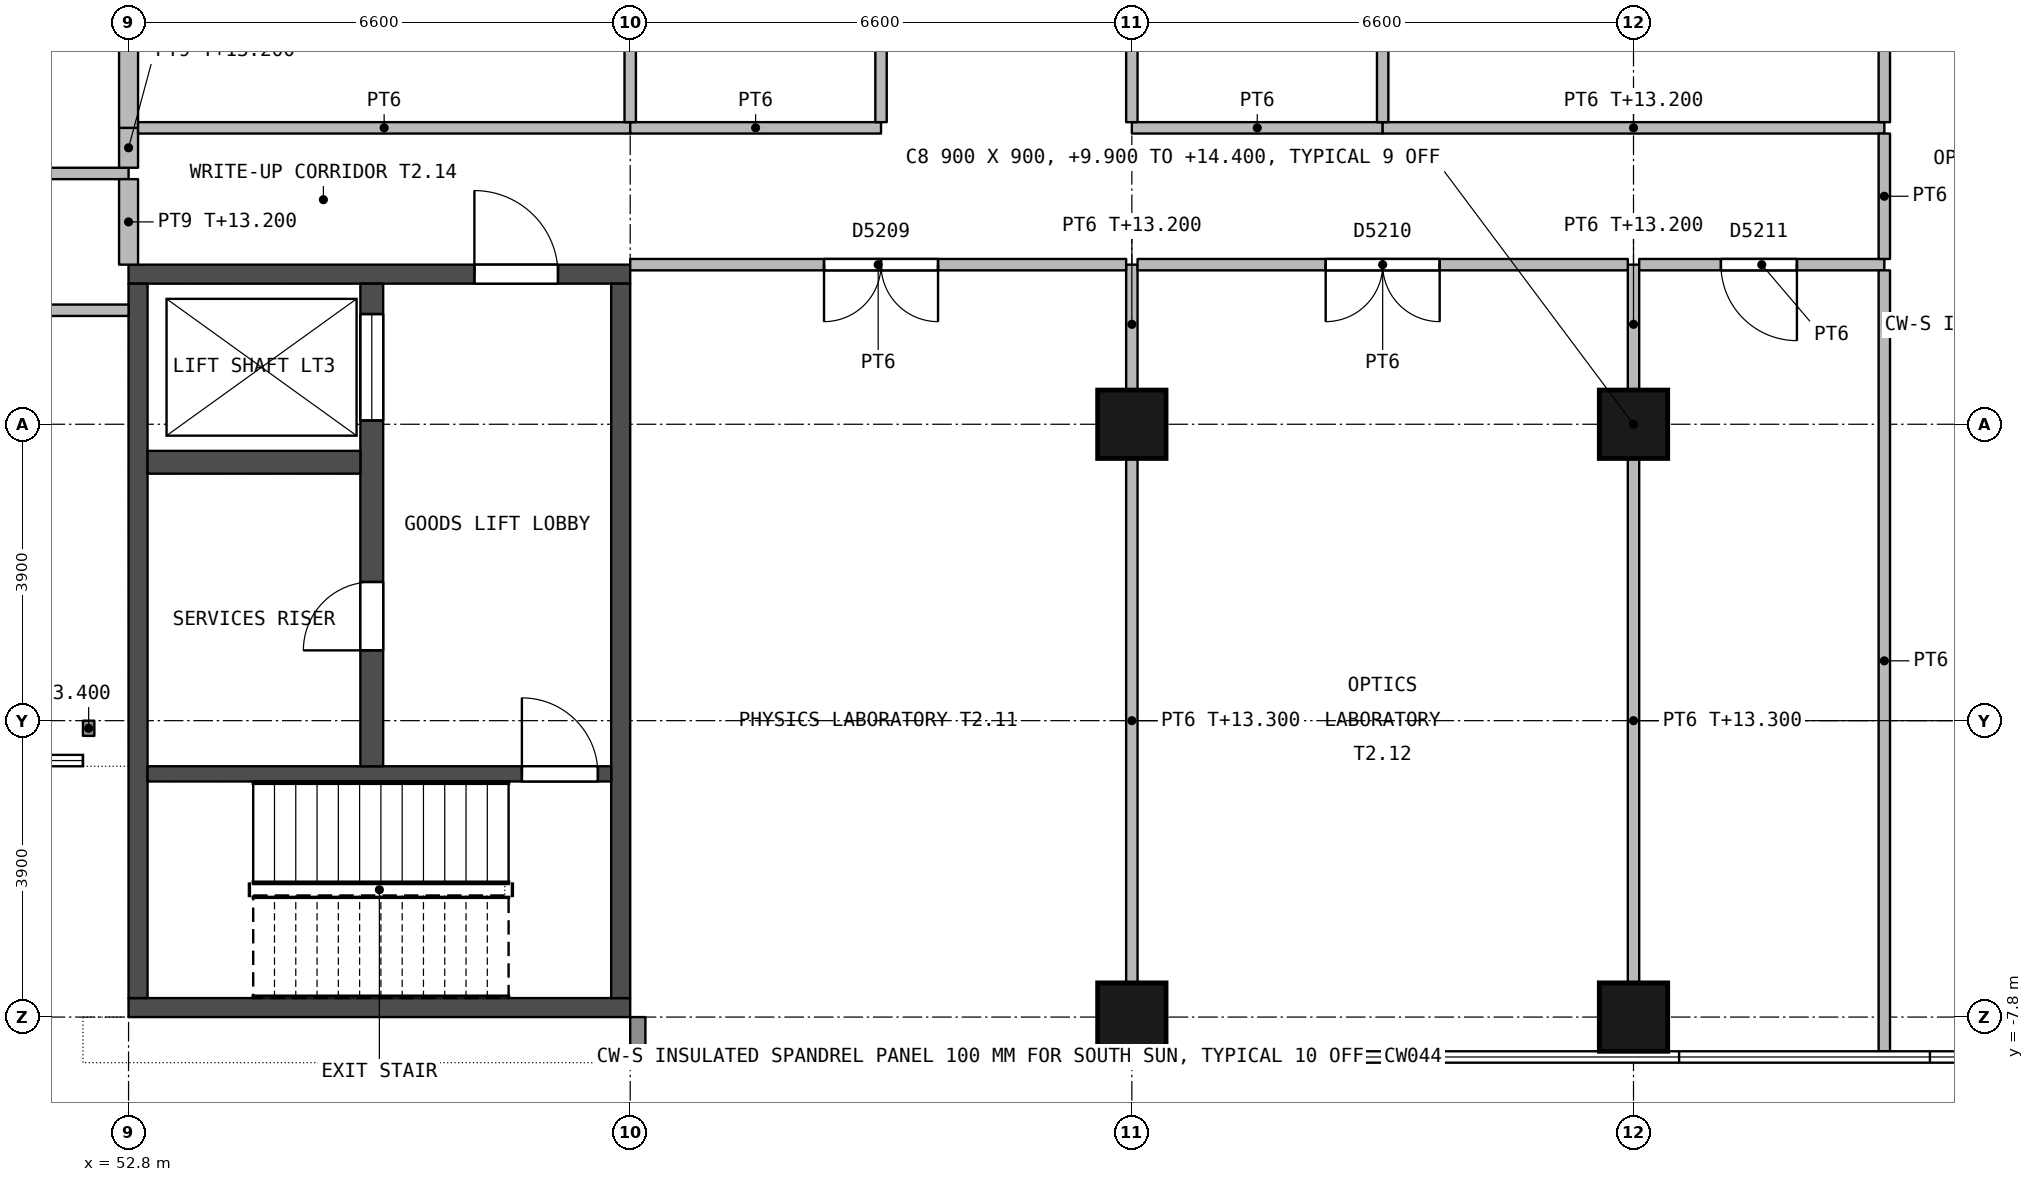
"""IFC4 building model, lengths in metres.
Left out: names, types, materials, properties, quantities, classifications, styles, units other than length and angle.
Written with IfcOpenShell. Run it as: python <this file> out.ifc"""

import sys

from ifc_helpers import new_model, si_unit, direction, frame, frame_2d, origin, origin_2d, place, context, subcontext, project, spatial, rectangle, extrude, element, fill, save


model = new_model("IFC4")
c1 = context("Model", 3, precision=1e-05, world=origin(), true_north=direction((0.0, 1.0)))
c2 = subcontext(c1, "Body", "Model", "MODEL_VIEW")
j1 = project(units=[si_unit("LENGTHUNIT", "METRE"), si_unit("PLANEANGLEUNIT", "RADIAN")], contexts=[c1])
p1 = place(None, origin())
s1 = spatial("IfcSite", under=j1, at=p1, CompositionType="ELEMENT")
p2 = place(p1, origin())
s2 = spatial("IfcBuilding", under=s1, at=p2, CompositionType="ELEMENT")
p3 = place(p2, frame((0.0, 0.0, 9.9)))
s3 = spatial("IfcBuildingStorey", under=s2, at=p3, CompositionType="ELEMENT", Elevation=9.9)
for number, where, z_axis, x_axis in (
    (1, (66.0, -7.8, 0.0), (0.0, 0.0, 1.0), (1.0, 0.0, 0.0)),
    (2, (66.0, 0.0, 0.0), (0.0, 0.0, 1.0), (1.0, 0.0, 0.0)),
    (3, (72.6, -7.8, 0.0), (0.0, 0.0, 1.0), (1.0, 0.0, 0.0)),
    (4, (72.6, 0.0, 0.0), (0.0, 0.0, 1.0), (1.0, 0.0, 0.0)),
):
    element("IfcColumn", number, at=place(p3, frame(where, z_axis=z_axis, x_axis=x_axis)), inside=s3, PredefinedType="COLUMN", context=c2, shape_type="SweptSolid", body=[
        extrude(rectangle(XDim=0.9, YDim=0.9, at=origin_2d()), origin(), (0.0, 0.0, 1.0), 4.5),
    ])
p4 = place(p3, frame((59.4, 1.975, 0.0), z_axis=(0.0, 0.0, 1.0), x_axis=(-1.0, 0.0, 0.0)))
e5 = element("IfcWall", 5, at=p4, inside=s3, PredefinedType="SHEAR", context=c2, shape_type="SweptSolid", body=[
    extrude(rectangle(XDim=6.6, YDim=0.25, at=frame_2d((3.3, 0.0))), origin(), (0.0, 0.0, 1.0), 4.2),
])
p5 = place(p4, frame((0.95, 0.0, 0.0)))
e6 = element("IfcOpeningElement", 6, at=p5, cuts=e5, PredefinedType="OPENING", context=c2, shape_type="SweptSolid", body=[
    extrude(rectangle(XDim=1.1, YDim=2.1, at=frame_2d((0.55, 1.05))), frame((0.0, 0.135, 0.0), z_axis=(0.0, -1.0, 0.0), x_axis=(1.0, 0.0, 0.0)), (0.0, 0.0, 1.0), 0.27),
])
p6 = place(p3, frame((59.4, -7.675, 0.0), z_axis=(0.0, 0.0, 1.0), x_axis=(-1.0, 0.0, 0.0)))
e7 = element("IfcWall", 7, at=p6, inside=s3, PredefinedType="SHEAR", context=c2, shape_type="SweptSolid", body=[
    extrude(rectangle(XDim=6.6, YDim=0.25, at=frame_2d((3.3, 0.0))), origin(), (0.0, 0.0, 1.0), 4.2),
])
for number, where, z_axis, x_axis in (
    (8, (59.275, 1.85, 0.0), (0.0, 0.0, 1.0), (0.0, -1.0, 0.0)),
    (9, (52.925, 1.85, 0.0), (0.0, 0.0, 1.0), (0.0, -1.0, 0.0)),
):
    element("IfcWall", number, at=place(p3, frame(where, z_axis=z_axis, x_axis=x_axis)), inside=s3, PredefinedType="SHEAR", context=c2, shape_type="SweptSolid", body=[
        extrude(rectangle(XDim=9.4, YDim=0.25, at=frame_2d((4.7, 0.0))), origin(), (0.0, 0.0, 1.0), 4.2),
    ])
p7 = place(p3, frame((59.15, -4.6, 0.0), z_axis=(0.0, 0.0, 1.0), x_axis=(-1.0, 0.0, 0.0)))
e10 = element("IfcWall", 10, at=p7, inside=s3, PredefinedType="SHEAR", context=c2, shape_type="SweptSolid", body=[
    extrude(rectangle(XDim=6.1, YDim=0.2, at=frame_2d((3.05, 0.0))), origin(), (0.0, 0.0, 1.0), 4.2),
])
p8 = place(p7, frame((0.175, 0.0, 0.0)))
e11 = element("IfcOpeningElement", 11, at=p8, cuts=e10, PredefinedType="OPENING", context=c2, shape_type="SweptSolid", body=[
    extrude(rectangle(XDim=1.0, YDim=2.1, at=frame_2d((0.5, 1.05))), frame((0.0, 0.11, 0.0), z_axis=(0.0, -1.0, 0.0), x_axis=(1.0, 0.0, 0.0)), (0.0, 0.0, 1.0), 0.22),
])
p9 = place(p3, frame((56.0, 1.85, 0.0), z_axis=(0.0, 0.0, 1.0), x_axis=(0.0, -1.0, 0.0)))
e12 = element("IfcWall", 12, at=p9, inside=s3, PredefinedType="SHEAR", context=c2, shape_type="SweptSolid", body=[
    extrude(rectangle(XDim=6.35, YDim=0.3, at=frame_2d((3.175, 0.0))), origin(), (0.0, 0.0, 1.0), 4.2),
])
p10 = place(p9, frame((3.925, 0.0, 0.0)))
e13 = element("IfcOpeningElement", 13, at=p10, cuts=e12, PredefinedType="OPENING", context=c2, shape_type="SweptSolid", body=[
    extrude(rectangle(XDim=0.9, YDim=2.1, at=frame_2d((0.45, 1.05))), frame((0.0, 0.16, 0.0), z_axis=(0.0, -1.0, 0.0), x_axis=(1.0, 0.0, 0.0)), (0.0, 0.0, 1.0), 0.32),
])
p11 = place(p9, frame((0.4, 0.0, 0.0)))
e14 = element("IfcOpeningElement", 14, at=p11, cuts=e12, PredefinedType="OPENING", context=c2, shape_type="SweptSolid", body=[
    extrude(rectangle(XDim=1.4, YDim=2.4, at=frame_2d((0.7, 1.2))), frame((0.0, 0.16, 0.0), z_axis=(0.0, -1.0, 0.0), x_axis=(1.0, 0.0, 0.0)), (0.0, 0.0, 1.0), 0.32),
])
p12 = place(p3, frame((55.85, -0.5, 0.0), z_axis=(0.0, 0.0, 1.0), x_axis=(-1.0, 0.0, 0.0)))
e15 = element("IfcWall", 15, at=p12, inside=s3, PredefinedType="SHEAR", context=c2, shape_type="SweptSolid", body=[
    extrude(rectangle(XDim=2.8, YDim=0.3, at=frame_2d((1.4, 0.0))), origin(), (0.0, 0.0, 1.0), 4.2),
])
p13 = place(p3, frame((59.5, -7.8, 0.0), z_axis=(0.0, 0.0, 1.0), x_axis=(0.0, -1.0, 0.0)))
e16 = element("IfcWall", 16, at=p13, inside=s3, PredefinedType="STANDARD", context=c2, shape_type="SweptSolid", body=[
    extrude(rectangle(XDim=0.6, YDim=0.2, at=frame_2d((0.3, 0.0))), origin(), (0.0, 0.0, 1.0), 3.5),
])
p14 = place(p3, frame((52.275, -4.1, 0.0), z_axis=(0.0, 0.0, 1.0), x_axis=(0.0, 1.0, 0.0)))
e17 = element("IfcWall", 17, at=p14, inside=s3, PredefinedType="STANDARD", context=c2, shape_type="SweptSolid", body=[
    extrude(rectangle(XDim=0.2, YDim=0.15, at=frame_2d((0.1, 0.0))), origin(), (0.0, 0.0, 1.0), 3.5),
])
p15 = place(p3, frame((52.8, 1.5, 0.0), z_axis=(0.0, 0.0, 1.0), x_axis=(-1.0, 0.0, 0.0)))
e18 = element("IfcWall", 18, at=p15, inside=s3, PredefinedType="PARTITIONING", context=c2, shape_type="SweptSolid", body=[
    extrude(rectangle(XDim=6.525, YDim=0.15, at=frame_2d((3.262, 0.0))), origin(), (0.0, 0.0, 1.0), 4.2),
])
p16 = place(p15, frame((2.55, 0.0, 0.0)))
e19 = element("IfcOpeningElement", 19, at=p16, cuts=e18, PredefinedType="OPENING", context=c2, shape_type="SweptSolid", body=[
    extrude(rectangle(XDim=1.5, YDim=2.1, at=frame_2d((0.75, 1.05))), frame((0.0, 0.085, 0.0), z_axis=(0.0, -1.0, 0.0), x_axis=(1.0, 0.0, 0.0)), (0.0, 0.0, 1.0), 0.17),
])
p17 = place(p3, frame((52.8, 3.3, 0.0), z_axis=(0.0, 0.0, 1.0), x_axis=(-1.0, 0.0, 0.0)))
e20 = element("IfcWall", 20, at=p17, inside=s3, PredefinedType="PARTITIONING", context=c2, shape_type="SweptSolid", body=[
    extrude(rectangle(XDim=6.6, YDim=0.15, at=frame_2d((3.3, 0.0))), origin(), (0.0, 0.0, 1.0), 3.6),
])
p18 = place(p3, frame((52.8, 2.1, 0.0), z_axis=(0.0, 0.0, 1.0), x_axis=(0.0, 1.0, 0.0)))
e21 = element("IfcWall", 21, at=p18, inside=s3, PredefinedType="PARTITIONING", context=c2, shape_type="SweptSolid", body=[
    extrude(rectangle(XDim=1.125, YDim=0.25, at=frame_2d((0.562, 0.0))), origin(), (0.0, 0.0, 1.0), 3.3),
])
p19 = place(p3, frame((52.8, 3.375, 0.0), z_axis=(0.0, 0.0, 1.0), x_axis=(0.0, 1.0, 0.0)))
e22 = element("IfcWall", 22, at=p19, inside=s3, PredefinedType="PARTITIONING", context=c2, shape_type="SweptSolid", body=[
    extrude(rectangle(XDim=0.525, YDim=0.25, at=frame_2d((0.262, 0.0))), origin(), (0.0, 0.0, 1.0), 3.3),
])
p20 = place(p3, frame((52.8, 3.9, 0.0), z_axis=(0.0, 0.0, 1.0), x_axis=(0.0, 1.0, 0.0)))
e23 = element("IfcWall", 23, at=p20, inside=s3, PredefinedType="PARTITIONING", context=c2, shape_type="SweptSolid", body=[
    extrude(rectangle(XDim=5.55, YDim=0.25, at=frame_2d((2.775, 0.0))), origin(), (0.0, 0.0, 1.0), 3.3),
])
p21 = place(p3, frame((66.0, -7.35, 0.0), z_axis=(0.0, 0.0, 1.0), x_axis=(0.0, 1.0, 0.0)))
e24 = element("IfcWall", 24, at=p21, inside=s3, PredefinedType="PARTITIONING", context=c2, shape_type="SweptSolid", body=[
    extrude(rectangle(XDim=6.9, YDim=0.15, at=frame_2d((3.45, 0.0))), origin(), (0.0, 0.0, 1.0), 3.4),
])
p22 = place(p3, frame((66.0, 0.45, 0.0), z_axis=(0.0, 0.0, 1.0), x_axis=(0.0, 1.0, 0.0)))
e25 = element("IfcWall", 25, at=p22, inside=s3, PredefinedType="PARTITIONING", context=c2, shape_type="SweptSolid", body=[
    extrude(rectangle(XDim=1.65, YDim=0.15, at=frame_2d((0.825, 0.0))), origin(), (0.0, 0.0, 1.0), 3.3),
])
p23 = place(p3, frame((65.925, 2.1, 0.0), z_axis=(0.0, 0.0, 1.0), x_axis=(-1.0, 0.0, 0.0)))
e26 = element("IfcWall", 26, at=p23, inside=s3, PredefinedType="PARTITIONING", context=c2, shape_type="SweptSolid", body=[
    extrude(rectangle(XDim=6.525, YDim=0.15, at=frame_2d((3.262, 0.0))), origin(), (0.0, 0.0, 1.0), 4.2),
])
p24 = place(p23, frame((2.475, 0.0, 0.0)))
e27 = element("IfcOpeningElement", 27, at=p24, cuts=e26, PredefinedType="OPENING", context=c2, shape_type="SweptSolid", body=[
    extrude(rectangle(XDim=1.5, YDim=2.1, at=frame_2d((0.75, 1.05))), frame((0.0, 0.085, 0.0), z_axis=(0.0, -1.0, 0.0), x_axis=(1.0, 0.0, 0.0)), (0.0, 0.0, 1.0), 0.17),
])
p25 = place(p3, frame((72.6, -7.35, 0.0), z_axis=(0.0, 0.0, 1.0), x_axis=(0.0, 1.0, 0.0)))
e28 = element("IfcWall", 28, at=p25, inside=s3, PredefinedType="PARTITIONING", context=c2, shape_type="SweptSolid", body=[
    extrude(rectangle(XDim=6.9, YDim=0.15, at=frame_2d((3.45, 0.0))), origin(), (0.0, 0.0, 1.0), 3.4),
])
p26 = place(p3, frame((72.6, 0.45, 0.0), z_axis=(0.0, 0.0, 1.0), x_axis=(0.0, 1.0, 0.0)))
e29 = element("IfcWall", 29, at=p26, inside=s3, PredefinedType="PARTITIONING", context=c2, shape_type="SweptSolid", body=[
    extrude(rectangle(XDim=1.65, YDim=0.15, at=frame_2d((0.825, 0.0))), origin(), (0.0, 0.0, 1.0), 3.3),
])
p27 = place(p3, frame((72.525, 2.1, 0.0), z_axis=(0.0, 0.0, 1.0), x_axis=(-1.0, 0.0, 0.0)))
e30 = element("IfcWall", 30, at=p27, inside=s3, PredefinedType="PARTITIONING", context=c2, shape_type="SweptSolid", body=[
    extrude(rectangle(XDim=6.45, YDim=0.15, at=frame_2d((3.225, 0.0))), origin(), (0.0, 0.0, 1.0), 4.2),
])
p28 = place(p27, frame((2.475, 0.0, 0.0)))
e31 = element("IfcOpeningElement", 31, at=p28, cuts=e30, PredefinedType="OPENING", context=c2, shape_type="SweptSolid", body=[
    extrude(rectangle(XDim=1.5, YDim=2.1, at=frame_2d((0.75, 1.05))), frame((0.0, 0.085, 0.0), z_axis=(0.0, -1.0, 0.0), x_axis=(1.0, 0.0, 0.0)), (0.0, 0.0, 1.0), 0.17),
])
p29 = place(p3, frame((75.9, 2.1, 0.0), z_axis=(0.0, 0.0, 1.0), x_axis=(-1.0, 0.0, 0.0)))
e32 = element("IfcWall", 32, at=p29, inside=s3, PredefinedType="PARTITIONING", context=c2, shape_type="SweptSolid", body=[
    extrude(rectangle(XDim=3.225, YDim=0.15, at=frame_2d((1.612, 0.0))), origin(), (0.0, 0.0, 1.0), 4.2),
])
p30 = place(p29, frame((1.15, 0.0, 0.0)))
e33 = element("IfcOpeningElement", 33, at=p30, cuts=e32, PredefinedType="OPENING", context=c2, shape_type="SweptSolid", body=[
    extrude(rectangle(XDim=1.0, YDim=2.1, at=frame_2d((0.5, 1.05))), frame((0.0, 0.085, 0.0), z_axis=(0.0, -1.0, 0.0), x_axis=(1.0, 0.0, 0.0)), (0.0, 0.0, 1.0), 0.17),
])
p31 = place(p3, frame((75.9, -8.25, 0.0), z_axis=(0.0, 0.0, 1.0), x_axis=(0.0, 1.0, 0.0)))
e34 = element("IfcWall", 34, at=p31, inside=s3, PredefinedType="PARTITIONING", context=c2, shape_type="SweptSolid", body=[
    extrude(rectangle(XDim=10.275, YDim=0.15, at=frame_2d((5.137, 0.0))), origin(), (0.0, 0.0, 1.0), 3.5),
])
p32 = place(p3, frame((59.4, 3.9, 0.0), z_axis=(0.0, 0.0, 1.0), x_axis=(-1.0, 0.0, 0.0)))
e35 = element("IfcWall", 35, at=p32, inside=s3, PredefinedType="PARTITIONING", context=c2, shape_type="SweptSolid", body=[
    extrude(rectangle(XDim=6.475, YDim=0.15, at=frame_2d((3.237, 0.0))), origin(), (0.0, 0.0, 1.0), 4.2),
])
for number, where, z_axis, x_axis in (
    (36, (62.7, 3.9, 0.0), (0.0, 0.0, 1.0), (-1.0, 0.0, 0.0)),
    (37, (69.3, 3.9, 0.0), (0.0, 0.0, 1.0), (-1.0, 0.0, 0.0)),
):
    element("IfcWall", number, at=place(p3, frame(where, z_axis=z_axis, x_axis=x_axis)), inside=s3, PredefinedType="PARTITIONING", context=c2, shape_type="SweptSolid", body=[
        extrude(rectangle(XDim=3.3, YDim=0.15, at=frame_2d((1.65, 0.0))), origin(), (0.0, 0.0, 1.0), 4.2),
    ])
p33 = place(p3, frame((75.9, 3.9, 0.0), z_axis=(0.0, 0.0, 1.0), x_axis=(-1.0, 0.0, 0.0)))
e38 = element("IfcWall", 38, at=p33, inside=s3, PredefinedType="PARTITIONING", context=c2, shape_type="SweptSolid", body=[
    extrude(rectangle(XDim=6.6, YDim=0.15, at=frame_2d((3.3, 0.0))), origin(), (0.0, 0.0, 1.0), 3.3),
])
p34 = place(p3, frame((75.9, 2.175, 0.0), z_axis=(0.0, 0.0, 1.0), x_axis=(0.0, 1.0, 0.0)))
e39 = element("IfcWall", 39, at=p34, inside=s3, PredefinedType="PARTITIONING", context=c2, shape_type="SweptSolid", body=[
    extrude(rectangle(XDim=1.65, YDim=0.15, at=frame_2d((0.825, 0.0))), origin(), (0.0, 0.0, 1.0), 4.2),
])
p35 = place(p3, frame((59.4, 3.975, 0.0), z_axis=(0.0, 0.0, 1.0), x_axis=(0.0, 1.0, 0.0)))
e40 = element("IfcWall", 40, at=p35, inside=s3, PredefinedType="PARTITIONING", context=c2, shape_type="SweptSolid", body=[
    extrude(rectangle(XDim=5.475, YDim=0.15, at=frame_2d((2.737, 0.0))), origin(), (0.0, 0.0, 1.0), 3.3),
])
p36 = place(p3, frame((62.7, 9.825, 0.0), z_axis=(0.0, 0.0, 1.0), x_axis=(0.0, -1.0, 0.0)))
e41 = element("IfcWall", 41, at=p36, inside=s3, PredefinedType="PARTITIONING", context=c2, shape_type="SweptSolid", body=[
    extrude(rectangle(XDim=5.85, YDim=0.15, at=frame_2d((2.925, 0.0))), origin(), (0.0, 0.0, 1.0), 4.2),
])
p37 = place(p36, frame((2.425, 0.0, 0.0)))
e42 = element("IfcOpeningElement", 42, at=p37, cuts=e41, PredefinedType="OPENING", context=c2, shape_type="SweptSolid", body=[
    extrude(rectangle(XDim=1.0, YDim=2.1, at=frame_2d((0.5, 1.05))), frame((0.0, 0.085, 0.0), z_axis=(0.0, -1.0, 0.0), x_axis=(1.0, 0.0, 0.0)), (0.0, 0.0, 1.0), 0.17),
])
p38 = place(p3, frame((66.0, 3.975, 0.0), z_axis=(0.0, 0.0, 1.0), x_axis=(0.0, 1.0, 0.0)))
e43 = element("IfcWall", 43, at=p38, inside=s3, PredefinedType="PARTITIONING", context=c2, shape_type="SweptSolid", body=[
    extrude(rectangle(XDim=5.475, YDim=0.15, at=frame_2d((2.737, 0.0))), origin(), (0.0, 0.0, 1.0), 3.3),
])
p39 = place(p38, frame((2.425, 0.0, 0.0)))
e44 = element("IfcOpeningElement", 44, at=p39, cuts=e43, PredefinedType="OPENING", context=c2, shape_type="SweptSolid", body=[
    extrude(rectangle(XDim=1.0, YDim=2.1, at=frame_2d((0.5, 1.05))), frame((0.0, 0.085, 0.0), z_axis=(0.0, -1.0, 0.0), x_axis=(1.0, 0.0, 0.0)), (0.0, 0.0, 1.0), 0.17),
])
for number, where, z_axis, x_axis in (
    (45, (69.3, 3.975, 0.0), (0.0, 0.0, 1.0), (0.0, 1.0, 0.0)),
    (46, (75.9, 3.975, 0.0), (0.0, 0.0, 1.0), (0.0, 1.0, 0.0)),
):
    element("IfcWall", number, at=place(p3, frame(where, z_axis=z_axis, x_axis=x_axis)), inside=s3, PredefinedType="PARTITIONING", context=c2, shape_type="SweptSolid", body=[
        extrude(rectangle(XDim=5.85, YDim=0.15, at=frame_2d((2.925, 0.0))), origin(), (0.0, 0.0, 1.0), 4.2),
    ])
p40 = place(p10, origin())
e47 = element("IfcDoor", 47, at=p40, inside=s3, OperationType="SINGLE_SWING_RIGHT", PredefinedType="DOOR", context=c2, shape_type="SweptSolid", body=[
    extrude(rectangle(XDim=0.9, YDim=2.1, at=frame_2d((0.45, 1.05))), frame((0.0, 0.025, 0.0), z_axis=(0.0, -1.0, 0.0), x_axis=(1.0, 0.0, 0.0)), (0.0, 0.0, 1.0), 0.05),
])
fill(e13, e47)
p41 = place(p5, origin())
e48 = element("IfcDoor", 48, at=p41, inside=s3, OperationType="SINGLE_SWING_RIGHT", PredefinedType="DOOR", context=c2, shape_type="SweptSolid", body=[
    extrude(rectangle(XDim=1.1, YDim=2.1, at=frame_2d((0.55, 1.05))), frame((0.0, 0.025, 0.0), z_axis=(0.0, -1.0, 0.0), x_axis=(1.0, 0.0, 0.0)), (0.0, 0.0, 1.0), 0.05),
])
fill(e6, e48)
p42 = place(p8, origin())
e49 = element("IfcDoor", 49, at=p42, inside=s3, OperationType="SINGLE_SWING_RIGHT", PredefinedType="DOOR", context=c2, shape_type="SweptSolid", body=[
    extrude(rectangle(XDim=1.0, YDim=2.1, at=frame_2d((0.5, 1.05))), frame((0.0, 0.025, 0.0), z_axis=(0.0, -1.0, 0.0), x_axis=(1.0, 0.0, 0.0)), (0.0, 0.0, 1.0), 0.05),
])
fill(e11, e49)
p43 = place(p11, origin())
e50 = element("IfcDoor", 50, at=p43, inside=s3, OperationType="DOUBLE_DOOR_SLIDING", PredefinedType="NOTDEFINED", context=c2, shape_type="SweptSolid", body=[
    extrude(rectangle(XDim=1.4, YDim=2.4, at=frame_2d((0.7, 1.2))), frame((0.0, 0.025, 0.0), z_axis=(0.0, -1.0, 0.0), x_axis=(1.0, 0.0, 0.0)), (0.0, 0.0, 1.0), 0.05),
])
fill(e14, e50)
p44 = place(p24, origin())
e51 = element("IfcDoor", 51, at=p44, inside=s3, OperationType="DOUBLE_DOOR_SINGLE_SWING", PredefinedType="DOOR", context=c2, shape_type="SweptSolid", body=[
    extrude(rectangle(XDim=1.5, YDim=2.1, at=frame_2d((0.75, 1.05))), frame((0.0, 0.027, 0.0), z_axis=(0.0, -1.0, 0.0), x_axis=(1.0, 0.0, 0.0)), (0.0, 0.0, 1.0), 0.054),
])
fill(e27, e51)
p45 = place(p28, origin())
e52 = element("IfcDoor", 52, at=p45, inside=s3, OperationType="DOUBLE_DOOR_SINGLE_SWING", PredefinedType="DOOR", context=c2, shape_type="SweptSolid", body=[
    extrude(rectangle(XDim=1.5, YDim=2.1, at=frame_2d((0.75, 1.05))), frame((0.0, 0.027, 0.0), z_axis=(0.0, -1.0, 0.0), x_axis=(1.0, 0.0, 0.0)), (0.0, 0.0, 1.0), 0.054),
])
fill(e31, e52)
p46 = place(p30, origin())
e53 = element("IfcDoor", 53, at=p46, inside=s3, OperationType="SINGLE_SWING_LEFT", PredefinedType="DOOR", context=c2, shape_type="SweptSolid", body=[
    extrude(rectangle(XDim=1.0, YDim=2.1, at=frame_2d((0.5, 1.05))), frame((0.0, 0.027, 0.0), z_axis=(0.0, -1.0, 0.0), x_axis=(1.0, 0.0, 0.0)), (0.0, 0.0, 1.0), 0.054),
])
fill(e33, e53)
save(model, sys.argv[1])
